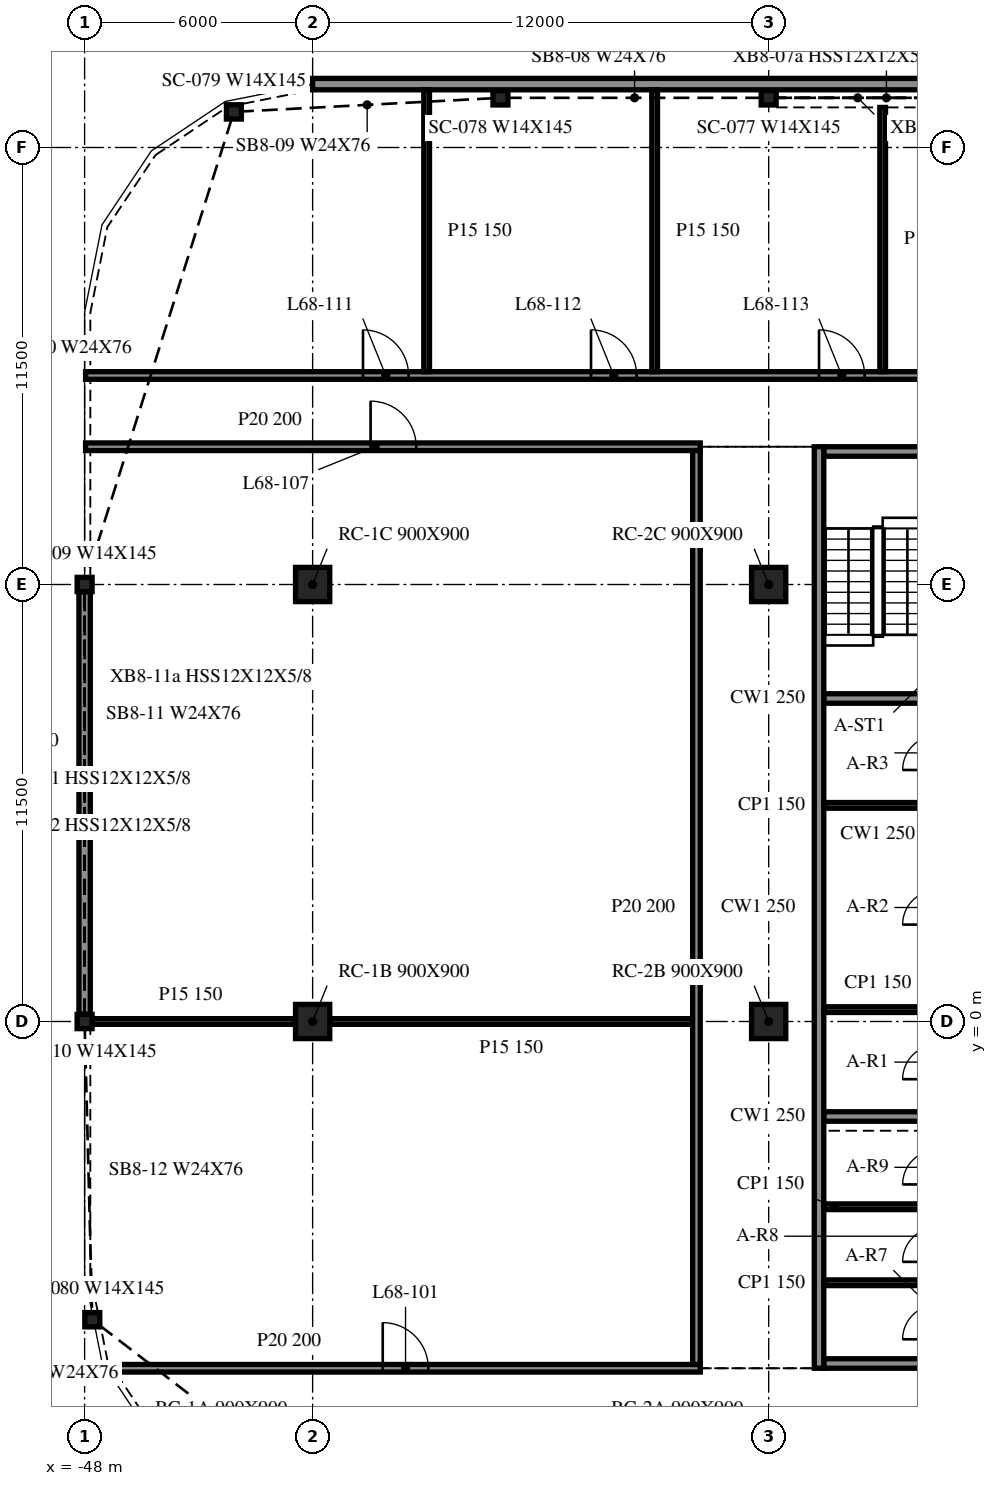
"""IFC4 building model, lengths in metres.
Left out: names, types, materials, properties, quantities, classifications, styles, units other than length and angle.
Written with IfcOpenShell. Run it as: python <this file> out.ifc"""

import sys

from ifc_helpers import new_model, si_unit, direction, frame, frame_2d, origin, origin_2d, place, context, subcontext, project, spatial, rectangle, i_section, extrude, element, fill, save


model = new_model("IFC4")
c1 = context("Model", 3, precision=1e-05, world=origin(), true_north=direction((0.0, 1.0)))
c2 = subcontext(c1, "Body", "Model", "MODEL_VIEW")
j1 = project(units=[si_unit("LENGTHUNIT", "METRE"), si_unit("PLANEANGLEUNIT", "RADIAN")], contexts=[c1])
p1 = place(None, origin())
s1 = spatial("IfcSite", under=j1, at=p1, CompositionType="ELEMENT")
p2 = place(p1, origin())
s2 = spatial("IfcBuilding", under=s1, at=p2, CompositionType="ELEMENT")
p3 = place(p2, frame((0.0, 0.0, 278.5)))
s3 = spatial("IfcBuildingStorey", under=s2, at=p3, CompositionType="ELEMENT", Elevation=278.5)
for number, where, z_axis, x_axis in (
    (1, (-42.0, 0.0, -0.34), (0.0, 0.0, 1.0), (1.0, 0.0, 0.0)),
    (2, (-42.0, 11.5, -0.34), (0.0, 0.0, 1.0), (1.0, 0.0, 0.0)),
    (3, (-30.0, 0.0, -0.34), (0.0, 0.0, 1.0), (1.0, 0.0, 0.0)),
    (4, (-30.0, 11.5, -0.34), (0.0, 0.0, 1.0), (1.0, 0.0, 0.0)),
):
    element("IfcColumn", number, at=place(p3, frame(where, z_axis=z_axis, x_axis=x_axis)), inside=s3, PredefinedType="COLUMN", context=c2, shape_type="SweptSolid", body=[
        extrude(rectangle(XDim=0.9, YDim=0.9, at=origin_2d()), origin(), (0.0, 0.0, 1.0), 3.8),
    ])
for number, where, z_axis, x_axis in (
    (5, (-30.0, 24.307, -0.34), (0.0, 0.0, 1.0), (1.0, 0.0, 0.0)),
    (6, (-37.058, 24.307, -0.34), (0.0, 0.0, 1.0), (1.0, 0.0, 0.0)),
    (7, (-44.072, 23.937, -0.34), (0.0, 0.0, 1.0), (1.0, 0.0, 0.0)),
    (8, (-48.0, 11.5, -0.34), (0.0, 0.0, 1.0), (1.0, 0.0, 0.0)),
    (9, (-48.0, 0.0, -0.34), (0.0, 0.0, 1.0), (1.0, 0.0, 0.0)),
    (10, (-47.798, -7.848, -0.34), (0.0, 0.0, 1.0), (1.0, 0.0, 0.0)),
):
    element("IfcColumn", number, at=place(p3, frame(where, z_axis=z_axis, x_axis=x_axis)), inside=s3, PredefinedType="COLUMN", context=c2, shape_type="SweptSolid", body=[
        extrude(i_section(OverallWidth=0.394, OverallDepth=0.376, WebThickness=0.017, FlangeThickness=0.028, at=origin_2d()), origin(), (0.0, 0.0, 1.0), 3.8),
    ])
p4 = place(p3, frame((42.0, 24.668, 0.0), z_axis=(0.0, 0.0, 1.0), x_axis=(-1.0, 0.0, 0.0)))
e11 = element("IfcWall", 11, at=p4, inside=s3, PredefinedType="NOTDEFINED", context=c2, shape_type="SweptSolid", body=[
    extrude(rectangle(XDim=84.0, YDim=0.3, at=frame_2d((42.0, 0.0))), origin(), (0.0, 0.0, 1.0), 2.853),
])
p5 = place(p3, frame((-48.0, 11.312, 0.0), z_axis=(0.0, 0.0, 1.0), x_axis=(0.0, -1.0, 0.0)))
e12 = element("IfcWall", 12, at=p5, inside=s3, PredefinedType="NOTDEFINED", context=c2, shape_type="SweptSolid", body=[
    extrude(rectangle(XDim=11.124, YDim=0.3, at=frame_2d((5.562, 0.0))), origin(), (0.0, 0.0, 1.0), 2.853),
])
p6 = place(p3, frame((-28.675, 15.125, 0.0), z_axis=(0.0, 0.0, 1.0), x_axis=(0.0, -1.0, 0.0)))
e13 = element("IfcWall", 13, at=p6, inside=s3, PredefinedType="SOLIDWALL", context=c2, shape_type="SweptSolid", body=[
    extrude(rectangle(XDim=24.25, YDim=0.25, at=frame_2d((12.125, 0.0))), origin(), (0.0, 0.0, 1.0), 3.46),
])
p7 = place(p3, frame((-19.45, -9.0, 0.0), z_axis=(0.0, 0.0, 1.0), x_axis=(-1.0, 0.0, 0.0)))
e14 = element("IfcWall", 14, at=p7, inside=s3, PredefinedType="SOLIDWALL", context=c2, shape_type="SweptSolid", body=[
    extrude(rectangle(XDim=9.1, YDim=0.25, at=frame_2d((4.55, 0.0))), origin(), (0.0, 0.0, 1.0), 3.46),
])
p8 = place(p7, frame((3.65, 0.0, 0.0)))
e15 = element("IfcOpeningElement", 15, at=p8, cuts=e14, PredefinedType="OPENING", context=c2, shape_type="SweptSolid", body=[
    extrude(rectangle(XDim=1.8, YDim=2.1, at=frame_2d((0.9, 1.05))), frame((0.0, 0.135, 0.0), z_axis=(0.0, -1.0, 0.0), x_axis=(1.0, 0.0, 0.0)), (0.0, 0.0, 1.0), 0.27),
])
p9 = place(p3, frame((-28.55, 15.0, 0.0), z_axis=(0.0, 0.0, 1.0), x_axis=(1.0, 0.0, 0.0)))
e16 = element("IfcWall", 16, at=p9, inside=s3, PredefinedType="SOLIDWALL", context=c2, shape_type="SweptSolid", body=[
    extrude(rectangle(XDim=9.1, YDim=0.25, at=frame_2d((4.55, 0.0))), origin(), (0.0, 0.0, 1.0), 3.46),
])
p10 = place(p9, frame((3.65, 0.0, 0.0)))
e17 = element("IfcOpeningElement", 17, at=p10, cuts=e16, PredefinedType="OPENING", context=c2, shape_type="SweptSolid", body=[
    extrude(rectangle(XDim=1.8, YDim=2.1, at=frame_2d((0.9, 1.05))), frame((0.0, 0.135, 0.0), z_axis=(0.0, -1.0, 0.0), x_axis=(1.0, 0.0, 0.0)), (0.0, 0.0, 1.0), 0.27),
])
for number, where, z_axis, x_axis in (
    (18, (-28.55, -2.5, 0.0), (0.0, 0.0, 1.0), (1.0, 0.0, 0.0)),
    (19, (-28.55, 8.5, 0.0), (0.0, 0.0, 1.0), (1.0, 0.0, 0.0)),
):
    element("IfcWall", number, at=place(p3, frame(where, z_axis=z_axis, x_axis=x_axis)), inside=s3, PredefinedType="SOLIDWALL", context=c2, shape_type="SweptSolid", body=[
        extrude(rectangle(XDim=2.85, YDim=0.25, at=frame_2d((1.425, 0.0))), origin(), (0.0, 0.0, 1.0), 3.46),
    ])
for number, where, z_axis, x_axis in (
    (20, (-28.55, 0.312, 0.0), (0.0, 0.0, 1.0), (1.0, 0.0, 0.0)),
    (21, (-28.55, 5.688, 0.0), (0.0, 0.0, 1.0), (1.0, 0.0, 0.0)),
    (22, (-28.55, -6.875, 0.0), (0.0, 0.0, 1.0), (1.0, 0.0, 0.0)),
    (23, (-28.55, -4.875, 0.0), (0.0, 0.0, 1.0), (1.0, 0.0, 0.0)),
):
    element("IfcWall", number, at=place(p3, frame(where, z_axis=z_axis, x_axis=x_axis)), inside=s3, PredefinedType="PARTITIONING", context=c2, shape_type="SweptSolid", body=[
        extrude(rectangle(XDim=2.85, YDim=0.15, at=frame_2d((1.425, 0.0))), origin(), (0.0, 0.0, 1.0), 3.46),
    ])
p11 = place(p3, frame((-47.255, -9.125, 0.0), z_axis=(0.0, 0.0, 1.0), x_axis=(1.0, 0.0, 0.0)))
e24 = element("IfcWall", 24, at=p11, inside=s3, PredefinedType="PARTITIONING", context=c2, shape_type="SweptSolid", body=[
    extrude(rectangle(XDim=15.455, YDim=0.2, at=frame_2d((7.728, 0.0))), origin(), (0.0, 0.0, 1.0), 3.46),
])
p12 = place(p11, frame((7.1, 0.0, 0.0)))
e25 = element("IfcOpeningElement", 25, at=p12, cuts=e24, PredefinedType="OPENING", context=c2, shape_type="SweptSolid", body=[
    extrude(rectangle(XDim=1.2, YDim=2.1, at=frame_2d((0.6, 1.05))), frame((0.0, 0.11, 0.0), z_axis=(0.0, -1.0, 0.0), x_axis=(1.0, 0.0, 0.0)), (0.0, 0.0, 1.0), 0.22),
])
p13 = place(p3, frame((-47.975, 0.0, 0.0), z_axis=(0.0, 0.0, 1.0), x_axis=(1.0, 0.0, 0.0)))
e26 = element("IfcWall", 26, at=p13, inside=s3, PredefinedType="PARTITIONING", context=c2, shape_type="SweptSolid", body=[
    extrude(rectangle(XDim=5.525, YDim=0.15, at=frame_2d((2.763, 0.0))), origin(), (0.0, 0.0, 1.0), 3.46),
])
p14 = place(p3, frame((-41.55, 0.0, 0.0), z_axis=(0.0, 0.0, 1.0), x_axis=(1.0, 0.0, 0.0)))
e27 = element("IfcWall", 27, at=p14, inside=s3, PredefinedType="PARTITIONING", context=c2, shape_type="SweptSolid", body=[
    extrude(rectangle(XDim=9.55, YDim=0.15, at=frame_2d((4.775, 0.0))), origin(), (0.0, 0.0, 1.0), 3.46),
])
p15 = place(p3, frame((-47.975, 15.125, 0.0), z_axis=(0.0, 0.0, 1.0), x_axis=(1.0, 0.0, 0.0)))
e28 = element("IfcWall", 28, at=p15, inside=s3, PredefinedType="PARTITIONING", context=c2, shape_type="SweptSolid", body=[
    extrude(rectangle(XDim=16.175, YDim=0.2, at=frame_2d((8.087, 0.0))), origin(), (0.0, 0.0, 1.0), 3.46),
])
p16 = place(p15, frame((7.5, 0.0, 0.0)))
e29 = element("IfcOpeningElement", 29, at=p16, cuts=e28, PredefinedType="OPENING", context=c2, shape_type="SweptSolid", body=[
    extrude(rectangle(XDim=1.2, YDim=2.1, at=frame_2d((0.6, 1.05))), frame((0.0, 0.11, 0.0), z_axis=(0.0, -1.0, 0.0), x_axis=(1.0, 0.0, 0.0)), (0.0, 0.0, 1.0), 0.22),
])
p17 = place(p3, frame((-47.975, 17.0, 0.0), z_axis=(0.0, 0.0, 1.0), x_axis=(1.0, 0.0, 0.0)))
e30 = element("IfcWall", 30, at=p17, inside=s3, PredefinedType="PARTITIONING", context=c2, shape_type="SweptSolid", body=[
    extrude(rectangle(XDim=95.95, YDim=0.2, at=frame_2d((47.975, 0.0))), origin(), (0.0, 0.0, 1.0), 3.46),
])
p18 = place(p17, frame((7.3, 0.0, 0.0)))
e31 = element("IfcOpeningElement", 31, at=p18, cuts=e30, PredefinedType="OPENING", context=c2, shape_type="SweptSolid", body=[
    extrude(rectangle(XDim=1.2, YDim=2.1, at=frame_2d((0.6, 1.05))), frame((0.0, 0.11, 0.0), z_axis=(0.0, -1.0, 0.0), x_axis=(1.0, 0.0, 0.0)), (0.0, 0.0, 1.0), 0.22),
])
p19 = place(p17, frame((13.3, 0.0, 0.0)))
e32 = element("IfcOpeningElement", 32, at=p19, cuts=e30, PredefinedType="OPENING", context=c2, shape_type="SweptSolid", body=[
    extrude(rectangle(XDim=1.2, YDim=2.1, at=frame_2d((0.6, 1.05))), frame((0.0, 0.11, 0.0), z_axis=(0.0, -1.0, 0.0), x_axis=(1.0, 0.0, 0.0)), (0.0, 0.0, 1.0), 0.22),
])
p20 = place(p17, frame((19.3, 0.0, 0.0)))
e33 = element("IfcOpeningElement", 33, at=p20, cuts=e30, PredefinedType="OPENING", context=c2, shape_type="SweptSolid", body=[
    extrude(rectangle(XDim=1.2, YDim=2.1, at=frame_2d((0.6, 1.05))), frame((0.0, 0.11, 0.0), z_axis=(0.0, -1.0, 0.0), x_axis=(1.0, 0.0, 0.0)), (0.0, 0.0, 1.0), 0.22),
])
p21 = place(p17, frame((28.5, 0.0, 0.0)))
e34 = element("IfcOpeningElement", 34, at=p21, cuts=e30, PredefinedType="OPENING", context=c2, shape_type="SweptSolid", body=[
    extrude(rectangle(XDim=1.0, YDim=2.1, at=frame_2d((0.5, 1.05))), frame((0.0, 0.11, 0.0), z_axis=(0.0, -1.0, 0.0), x_axis=(1.0, 0.0, 0.0)), (0.0, 0.0, 1.0), 0.22),
])
p22 = place(p17, frame((31.3, 0.0, 0.0)))
e35 = element("IfcOpeningElement", 35, at=p22, cuts=e30, PredefinedType="OPENING", context=c2, shape_type="SweptSolid", body=[
    extrude(rectangle(XDim=1.2, YDim=2.1, at=frame_2d((0.6, 1.05))), frame((0.0, 0.11, 0.0), z_axis=(0.0, -1.0, 0.0), x_axis=(1.0, 0.0, 0.0)), (0.0, 0.0, 1.0), 0.22),
])
p23 = place(p17, frame((37.5, 0.0, 0.0)))
e36 = element("IfcOpeningElement", 36, at=p23, cuts=e30, PredefinedType="OPENING", context=c2, shape_type="SweptSolid", body=[
    extrude(rectangle(XDim=1.0, YDim=2.1, at=frame_2d((0.5, 1.05))), frame((0.0, 0.11, 0.0), z_axis=(0.0, -1.0, 0.0), x_axis=(1.0, 0.0, 0.0)), (0.0, 0.0, 1.0), 0.22),
])
p24 = place(p17, frame((43.3, 0.0, 0.0)))
e37 = element("IfcOpeningElement", 37, at=p24, cuts=e30, PredefinedType="OPENING", context=c2, shape_type="SweptSolid", body=[
    extrude(rectangle(XDim=1.2, YDim=2.1, at=frame_2d((0.6, 1.05))), frame((0.0, 0.11, 0.0), z_axis=(0.0, -1.0, 0.0), x_axis=(1.0, 0.0, 0.0)), (0.0, 0.0, 1.0), 0.22),
])
p25 = place(p17, frame((47.3, 0.0, 0.0)))
e38 = element("IfcOpeningElement", 38, at=p25, cuts=e30, PredefinedType="OPENING", context=c2, shape_type="SweptSolid", body=[
    extrude(rectangle(XDim=1.2, YDim=2.1, at=frame_2d((0.6, 1.05))), frame((0.0, 0.11, 0.0), z_axis=(0.0, -1.0, 0.0), x_axis=(1.0, 0.0, 0.0)), (0.0, 0.0, 1.0), 0.22),
])
p26 = place(p17, frame((51.1, 0.0, 0.0)))
e39 = element("IfcOpeningElement", 39, at=p26, cuts=e30, PredefinedType="OPENING", context=c2, shape_type="SweptSolid", body=[
    extrude(rectangle(XDim=1.2, YDim=2.1, at=frame_2d((0.6, 1.05))), frame((0.0, 0.11, 0.0), z_axis=(0.0, -1.0, 0.0), x_axis=(1.0, 0.0, 0.0)), (0.0, 0.0, 1.0), 0.22),
])
p27 = place(p17, frame((60.1, 0.0, 0.0)))
e40 = element("IfcOpeningElement", 40, at=p27, cuts=e30, PredefinedType="OPENING", context=c2, shape_type="SweptSolid", body=[
    extrude(rectangle(XDim=1.0, YDim=2.1, at=frame_2d((0.5, 1.05))), frame((0.0, 0.11, 0.0), z_axis=(0.0, -1.0, 0.0), x_axis=(1.0, 0.0, 0.0)), (0.0, 0.0, 1.0), 0.22),
])
p28 = place(p17, frame((63.1, 0.0, 0.0)))
e41 = element("IfcOpeningElement", 41, at=p28, cuts=e30, PredefinedType="OPENING", context=c2, shape_type="SweptSolid", body=[
    extrude(rectangle(XDim=1.2, YDim=2.1, at=frame_2d((0.6, 1.05))), frame((0.0, 0.11, 0.0), z_axis=(0.0, -1.0, 0.0), x_axis=(1.0, 0.0, 0.0)), (0.0, 0.0, 1.0), 0.22),
])
p29 = place(p17, frame((69.1, 0.0, 0.0)))
e42 = element("IfcOpeningElement", 42, at=p29, cuts=e30, PredefinedType="OPENING", context=c2, shape_type="SweptSolid", body=[
    extrude(rectangle(XDim=1.0, YDim=2.1, at=frame_2d((0.5, 1.05))), frame((0.0, 0.11, 0.0), z_axis=(0.0, -1.0, 0.0), x_axis=(1.0, 0.0, 0.0)), (0.0, 0.0, 1.0), 0.22),
])
p30 = place(p17, frame((75.1, 0.0, 0.0)))
e43 = element("IfcOpeningElement", 43, at=p30, cuts=e30, PredefinedType="OPENING", context=c2, shape_type="SweptSolid", body=[
    extrude(rectangle(XDim=1.2, YDim=2.1, at=frame_2d((0.6, 1.05))), frame((0.0, 0.11, 0.0), z_axis=(0.0, -1.0, 0.0), x_axis=(1.0, 0.0, 0.0)), (0.0, 0.0, 1.0), 0.22),
])
p31 = place(p17, frame((81.1, 0.0, 0.0)))
e44 = element("IfcOpeningElement", 44, at=p31, cuts=e30, PredefinedType="OPENING", context=c2, shape_type="SweptSolid", body=[
    extrude(rectangle(XDim=1.2, YDim=2.1, at=frame_2d((0.6, 1.05))), frame((0.0, 0.11, 0.0), z_axis=(0.0, -1.0, 0.0), x_axis=(1.0, 0.0, 0.0)), (0.0, 0.0, 1.0), 0.22),
])
p32 = place(p17, frame((90.1, 0.0, 0.0)))
e45 = element("IfcOpeningElement", 45, at=p32, cuts=e30, PredefinedType="OPENING", context=c2, shape_type="SweptSolid", body=[
    extrude(rectangle(XDim=1.2, YDim=2.1, at=frame_2d((0.6, 1.05))), frame((0.0, 0.11, 0.0), z_axis=(0.0, -1.0, 0.0), x_axis=(1.0, 0.0, 0.0)), (0.0, 0.0, 1.0), 0.22),
])
for number, where, z_axis, x_axis in (
    (46, (-39.0, 17.1, 0.0), (0.0, 0.0, 1.0), (0.0, 1.0, 0.0)),
    (47, (-33.0, 17.1, 0.0), (0.0, 0.0, 1.0), (0.0, 1.0, 0.0)),
):
    element("IfcWall", number, at=place(p3, frame(where, z_axis=z_axis, x_axis=x_axis)), inside=s3, PredefinedType="PARTITIONING", context=c2, shape_type="SweptSolid", body=[
        extrude(rectangle(XDim=7.418, YDim=0.15, at=frame_2d((3.709, 0.0))), origin(), (0.0, 0.0, 1.0), 3.46),
    ])
p33 = place(p3, frame((-31.9, -9.025, 0.0), z_axis=(0.0, 0.0, 1.0), x_axis=(0.0, 1.0, 0.0)))
e48 = element("IfcWall", 48, at=p33, inside=s3, PredefinedType="PARTITIONING", context=c2, shape_type="SweptSolid", body=[
    extrude(rectangle(XDim=24.05, YDim=0.2, at=frame_2d((12.025, 0.0))), origin(), (0.0, 0.0, 1.0), 3.46),
])
p34 = place(p3, frame((-27.0, 17.1, 0.0), z_axis=(0.0, 0.0, 1.0), x_axis=(0.0, 1.0, 0.0)))
e49 = element("IfcWall", 49, at=p34, inside=s3, PredefinedType="PARTITIONING", context=c2, shape_type="SweptSolid", body=[
    extrude(rectangle(XDim=6.955, YDim=0.15, at=frame_2d((3.477, 0.0))), origin(), (0.0, 0.0, 1.0), 3.46),
])
p35 = place(p12, origin())
e50 = element("IfcDoor", 50, at=p35, inside=s3, OperationType="SINGLE_SWING_LEFT", PredefinedType="DOOR", context=c2, shape_type="SweptSolid", body=[
    extrude(rectangle(XDim=1.2, YDim=2.1, at=frame_2d((0.6, 1.05))), frame((0.0, 0.025, 0.0), z_axis=(0.0, -1.0, 0.0), x_axis=(1.0, 0.0, 0.0)), (0.0, 0.0, 1.0), 0.05),
])
fill(e25, e50)
p36 = place(p16, origin())
e51 = element("IfcDoor", 51, at=p36, inside=s3, OperationType="SINGLE_SWING_LEFT", PredefinedType="DOOR", context=c2, shape_type="SweptSolid", body=[
    extrude(rectangle(XDim=1.2, YDim=2.1, at=frame_2d((0.6, 1.05))), frame((0.0, 0.025, 0.0), z_axis=(0.0, -1.0, 0.0), x_axis=(1.0, 0.0, 0.0)), (0.0, 0.0, 1.0), 0.05),
])
fill(e29, e51)
p37 = place(p18, origin())
e52 = element("IfcDoor", 52, at=p37, inside=s3, OperationType="SINGLE_SWING_LEFT", PredefinedType="DOOR", context=c2, shape_type="SweptSolid", body=[
    extrude(rectangle(XDim=1.2, YDim=2.1, at=frame_2d((0.6, 1.05))), frame((0.0, 0.025, 0.0), z_axis=(0.0, -1.0, 0.0), x_axis=(1.0, 0.0, 0.0)), (0.0, 0.0, 1.0), 0.05),
])
fill(e31, e52)
p38 = place(p19, origin())
e53 = element("IfcDoor", 53, at=p38, inside=s3, OperationType="SINGLE_SWING_LEFT", PredefinedType="DOOR", context=c2, shape_type="SweptSolid", body=[
    extrude(rectangle(XDim=1.2, YDim=2.1, at=frame_2d((0.6, 1.05))), frame((0.0, 0.025, 0.0), z_axis=(0.0, -1.0, 0.0), x_axis=(1.0, 0.0, 0.0)), (0.0, 0.0, 1.0), 0.05),
])
fill(e32, e53)
p39 = place(p20, origin())
e54 = element("IfcDoor", 54, at=p39, inside=s3, OperationType="SINGLE_SWING_LEFT", PredefinedType="DOOR", context=c2, shape_type="SweptSolid", body=[
    extrude(rectangle(XDim=1.2, YDim=2.1, at=frame_2d((0.6, 1.05))), frame((0.0, 0.025, 0.0), z_axis=(0.0, -1.0, 0.0), x_axis=(1.0, 0.0, 0.0)), (0.0, 0.0, 1.0), 0.05),
])
fill(e33, e54)
save(model, sys.argv[1])
